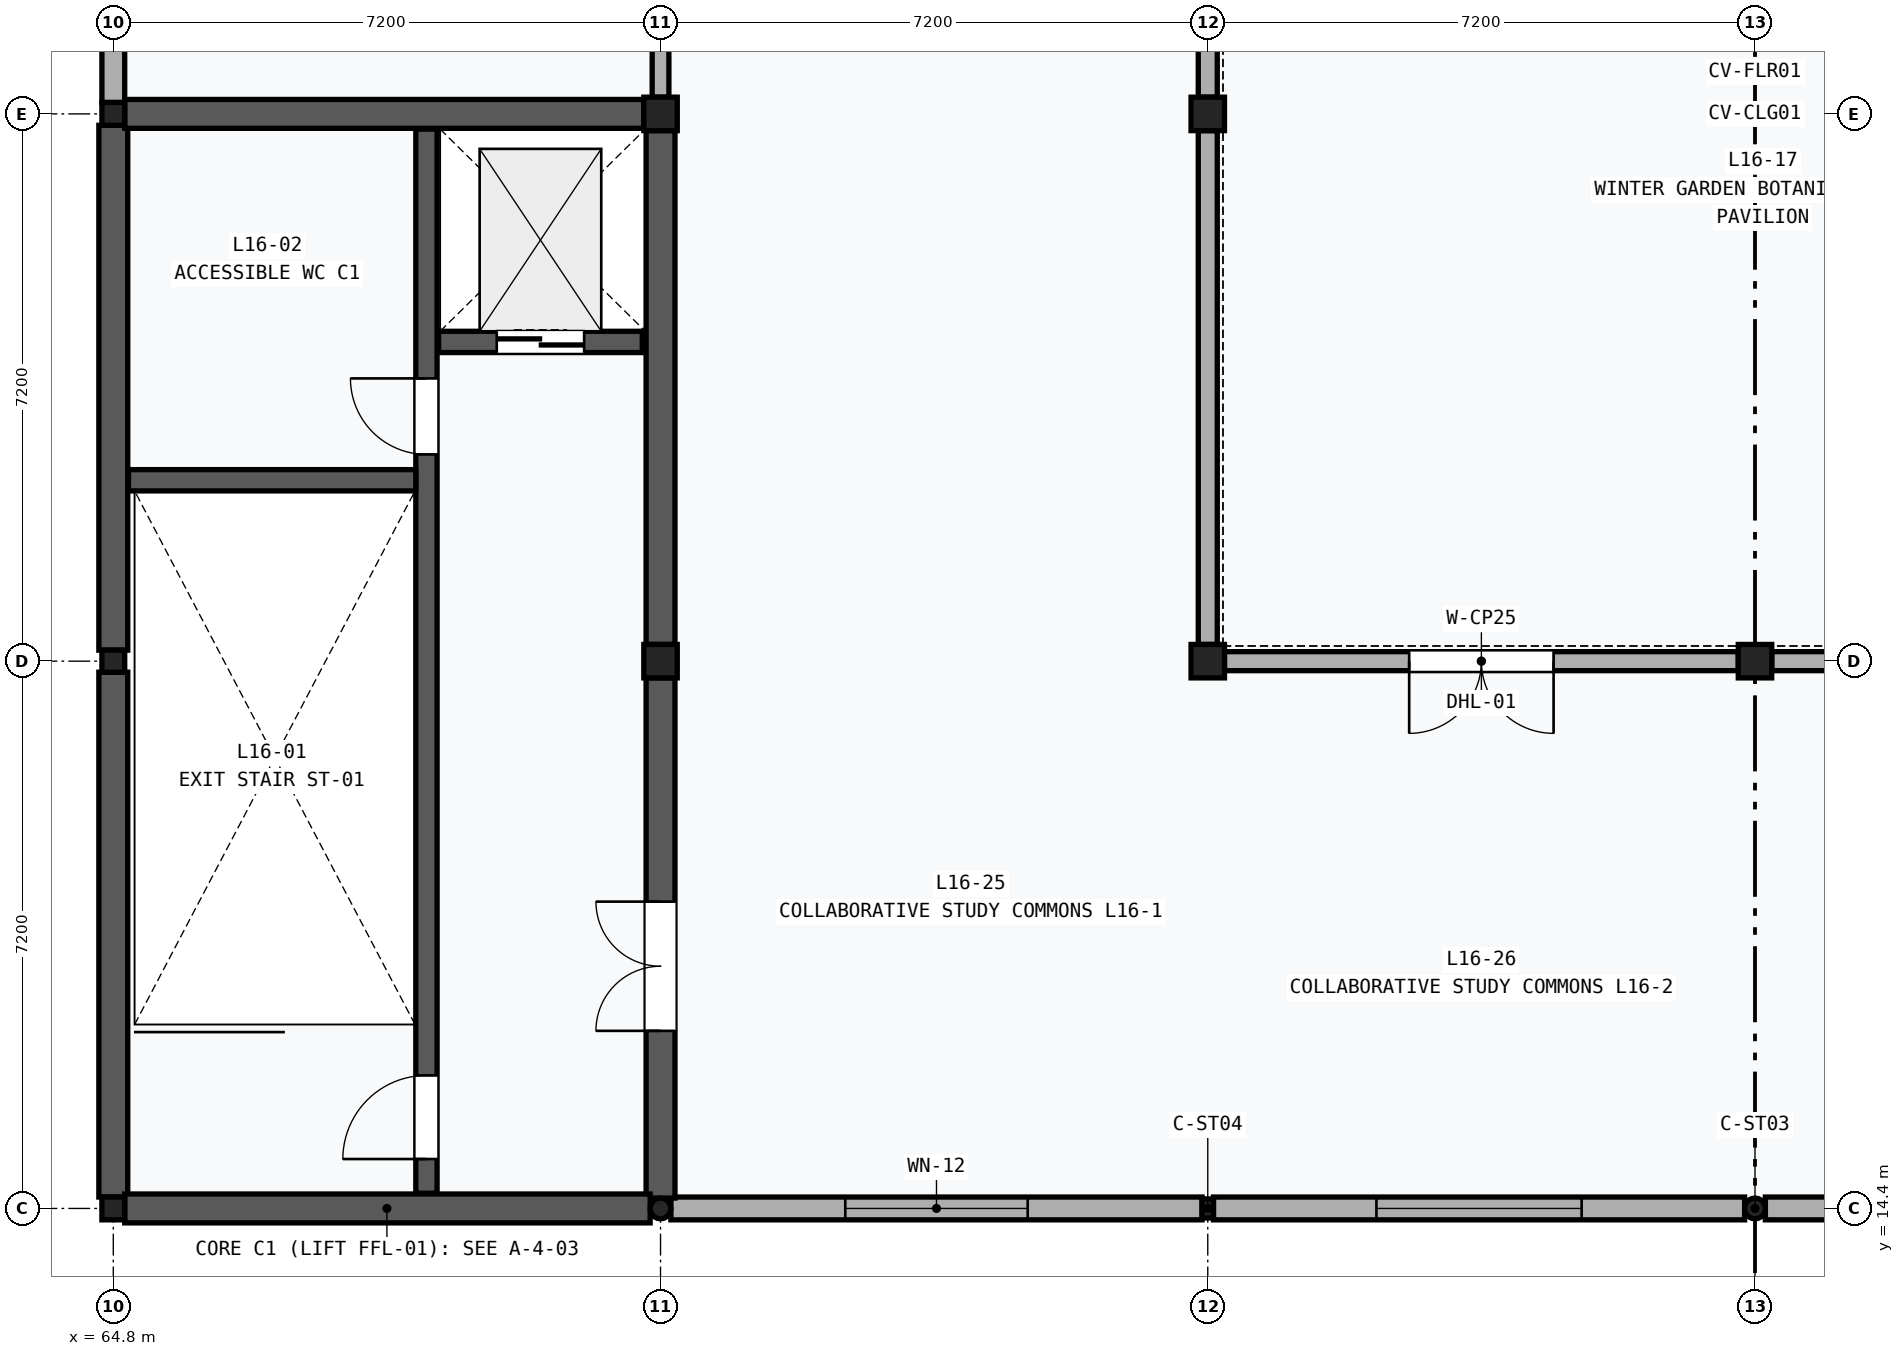
"""IFC4 building model, lengths in metres.
Left out: names, types, materials, properties, quantities, classifications, styles, units other than length and angle.
Written with IfcOpenShell. Run it as: python <this file> out.ifc"""

import sys

from ifc_helpers import new_model, si_unit, direction, frame, frame_2d, origin, origin_2d, place, context, subcontext, project, spatial, rectangle, hollow_rectangle, hollow_circle, i_section, extrude, element, fill, save


model = new_model("IFC4")
c1 = context("Model", 3, precision=1e-05, world=origin(), true_north=direction((0.0, 1.0)))
c2 = subcontext(c1, "Body", "Model", "MODEL_VIEW")
j1 = project(units=[si_unit("LENGTHUNIT", "METRE"), si_unit("PLANEANGLEUNIT", "RADIAN")], contexts=[c1])
p1 = place(None, origin())
s1 = spatial("IfcSite", under=j1, at=p1, CompositionType="ELEMENT")
p2 = place(p1, origin())
s2 = spatial("IfcBuilding", under=s1, at=p2, CompositionType="ELEMENT")
p3 = place(p2, frame((0.0, 0.0, 67.2)))
s3 = spatial("IfcBuildingStorey", under=s2, at=p3, CompositionType="ELEMENT", Elevation=67.2)
p4 = place(p3, frame((64.8, 14.4, 0.0), z_axis=(0.0, 0.0, 1.0), x_axis=(1.0, 0.0, 0.0)))
e1 = element("IfcColumn", 1, at=p4, inside=s3, PredefinedType="COLUMN", context=c2, shape_type="SweptSolid", body=[
    extrude(i_section(OverallWidth=0.3, OverallDepth=0.3, WebThickness=0.011, FlangeThickness=0.019, FilletRadius=0.027, at=origin_2d()), origin(), (0.0, 0.0, 1.0), 4.8),
])
p5 = place(p3, frame((64.8, 21.6, 0.0), z_axis=(0.0, 0.0, 1.0), x_axis=(1.0, 0.0, 0.0)))
e2 = element("IfcColumn", 2, at=p5, inside=s3, PredefinedType="COLUMN", context=c2, shape_type="SweptSolid", body=[
    extrude(i_section(OverallWidth=0.3, OverallDepth=0.29, WebThickness=0.009, FlangeThickness=0.014, FilletRadius=0.027, at=origin_2d()), origin(), (0.0, 0.0, 1.0), 4.8),
])
p6 = place(p3, frame((64.8, 28.8, 0.0), z_axis=(0.0, 0.0, 1.0), x_axis=(1.0, 0.0, 0.0)))
e3 = element("IfcColumn", 3, at=p6, inside=s3, PredefinedType="COLUMN", context=c2, shape_type="SweptSolid", body=[
    extrude(i_section(OverallWidth=0.3, OverallDepth=0.3, WebThickness=0.011, FlangeThickness=0.019, FilletRadius=0.027, at=origin_2d()), origin(), (0.0, 0.0, 1.0), 4.8),
])
p7 = place(p3, frame((72.0, 14.4, 0.0), z_axis=(0.0, 0.0, 1.0), x_axis=(1.0, 0.0, 0.0)))
e4 = element("IfcColumn", 4, at=p7, inside=s3, PredefinedType="COLUMN", context=c2, shape_type="SweptSolid", body=[
    extrude(hollow_circle(Radius=0.136, WallThickness=0.012, at=origin_2d()), origin(), (0.0, 0.0, 1.0), 4.8),
])
for number, where, z_axis, x_axis in (
    (5, (72.0, 21.6, 0.0), (0.0, 0.0, 1.0), (1.0, 0.0, 0.0)),
    (6, (72.0, 28.8, 0.0), (0.0, 0.0, 1.0), (1.0, 0.0, 0.0)),
):
    element("IfcColumn", number, at=place(p3, frame(where, z_axis=z_axis, x_axis=x_axis)), inside=s3, PredefinedType="COLUMN", context=c2, shape_type="SweptSolid", body=[
        extrude(rectangle(XDim=0.44, YDim=0.44, at=origin_2d()), origin(), (0.0, 0.0, 1.0), 4.8),
    ])
p8 = place(p3, frame((79.2, 14.4, 0.0), z_axis=(0.0, 0.0, 1.0), x_axis=(1.0, 0.0, 0.0)))
e7 = element("IfcColumn", 7, at=p8, inside=s3, PredefinedType="COLUMN", context=c2, shape_type="SweptSolid", body=[
    extrude(hollow_rectangle(XDim=0.15, YDim=0.25, WallThickness=0.01, at=origin_2d()), origin(), (0.0, 0.0, 1.0), 4.8),
])
for number, where, z_axis, x_axis in (
    (8, (79.2, 21.6, 0.0), (0.0, 0.0, 1.0), (1.0, 0.0, 0.0)),
    (9, (79.2, 28.8, 0.0), (0.0, 0.0, 1.0), (1.0, 0.0, 0.0)),
):
    element("IfcColumn", number, at=place(p3, frame(where, z_axis=z_axis, x_axis=x_axis)), inside=s3, PredefinedType="COLUMN", context=c2, shape_type="SweptSolid", body=[
        extrude(rectangle(XDim=0.44, YDim=0.44, at=origin_2d()), origin(), (0.0, 0.0, 1.0), 4.8),
    ])
p9 = place(p3, frame((86.4, 14.4, 0.0), z_axis=(0.0, 0.0, 1.0), x_axis=(1.0, 0.0, 0.0)))
e10 = element("IfcColumn", 10, at=p9, inside=s3, PredefinedType="COLUMN", context=c2, shape_type="SweptSolid", body=[
    extrude(hollow_circle(Radius=0.136, WallThickness=0.012, at=origin_2d()), origin(), (0.0, 0.0, 1.0), 4.8),
])
p10 = place(p3, frame((86.4, 21.6, 0.0), z_axis=(0.0, 0.0, 1.0), x_axis=(1.0, 0.0, 0.0)))
e11 = element("IfcColumn", 11, at=p10, inside=s3, PredefinedType="COLUMN", context=c2, shape_type="SweptSolid", body=[
    extrude(rectangle(XDim=0.44, YDim=0.44, at=origin_2d()), origin(), (0.0, 0.0, 1.0), 4.8),
])
p11 = place(p3, frame((64.8, 28.95, 0.0), z_axis=(0.0, 0.0, 1.0), x_axis=(0.0, 1.0, 0.0)))
e12 = element("IfcWall", 12, at=p11, inside=s3, PredefinedType="SOLIDWALL", context=c2, shape_type="SweptSolid", body=[
    extrude(rectangle(XDim=6.905, YDim=0.3, at=frame_2d((3.453, 0.0))), origin(), (0.0, 0.0, 1.0), 4.16),
])
p12 = place(p11, frame((2.103, 0.0, 0.85)))
e13 = element("IfcOpeningElement", 13, at=p12, cuts=e12, PredefinedType="OPENING", context=c2, shape_type="SweptSolid", body=[
    extrude(rectangle(XDim=2.7, YDim=2.0, at=frame_2d((1.35, 1.0))), frame((0.0, 0.162, 0.0), z_axis=(0.0, -1.0, 0.0), x_axis=(1.0, 0.0, 0.0)), (0.0, 0.0, 1.0), 0.324),
])
p13 = place(p3, frame((72.136, 14.4, 0.0), z_axis=(0.0, 0.0, 1.0), x_axis=(1.0, 0.0, 0.0)))
e14 = element("IfcWall", 14, at=p13, inside=s3, PredefinedType="SOLIDWALL", context=c2, shape_type="SweptSolid", body=[
    extrude(rectangle(XDim=6.989, YDim=0.3, at=frame_2d((3.494, 0.0))), origin(), (0.0, 0.0, 1.0), 4.16),
])
p14 = place(p13, frame((2.294, 0.0, 0.85)))
e15 = element("IfcOpeningElement", 15, at=p14, cuts=e14, PredefinedType="OPENING", context=c2, shape_type="SweptSolid", body=[
    extrude(rectangle(XDim=2.4, YDim=2.0, at=frame_2d((1.2, 1.0))), frame((0.0, 0.162, 0.0), z_axis=(0.0, -1.0, 0.0), x_axis=(1.0, 0.0, 0.0)), (0.0, 0.0, 1.0), 0.324),
])
p15 = place(p3, frame((79.275, 14.4, 0.0), z_axis=(0.0, 0.0, 1.0), x_axis=(1.0, 0.0, 0.0)))
e16 = element("IfcWall", 16, at=p15, inside=s3, PredefinedType="SOLIDWALL", context=c2, shape_type="SweptSolid", body=[
    extrude(rectangle(XDim=6.989, YDim=0.3, at=frame_2d((3.494, 0.0))), origin(), (0.0, 0.0, 1.0), 4.16),
])
p16 = place(p15, frame((2.144, 0.0, 0.85)))
e17 = element("IfcOpeningElement", 17, at=p16, cuts=e16, PredefinedType="OPENING", context=c2, shape_type="SweptSolid", body=[
    extrude(rectangle(XDim=2.7, YDim=2.0, at=frame_2d((1.35, 1.0))), frame((0.0, 0.162, 0.0), z_axis=(0.0, -1.0, 0.0), x_axis=(1.0, 0.0, 0.0)), (0.0, 0.0, 1.0), 0.324),
])
p17 = place(p3, frame((86.537, 14.4, 0.0), z_axis=(0.0, 0.0, 1.0), x_axis=(1.0, 0.0, 0.0)))
e18 = element("IfcWall", 18, at=p17, inside=s3, PredefinedType="SOLIDWALL", context=c2, shape_type="SweptSolid", body=[
    extrude(rectangle(XDim=6.988, YDim=0.3, at=frame_2d((3.494, 0.0))), origin(), (0.0, 0.0, 1.0), 4.16),
])
p18 = place(p17, frame((1.994, 0.0, 0.85)))
e19 = element("IfcOpeningElement", 19, at=p18, cuts=e18, PredefinedType="OPENING", context=c2, shape_type="SweptSolid", body=[
    extrude(rectangle(XDim=3.0, YDim=2.0, at=frame_2d((1.5, 1.0))), frame((0.0, 0.162, 0.0), z_axis=(0.0, -1.0, 0.0), x_axis=(1.0, 0.0, 0.0)), (0.0, 0.0, 1.0), 0.324),
])
p19 = place(p3, frame((64.8, 14.55, 0.0), z_axis=(0.0, 0.0, 1.0), x_axis=(0.0, 1.0, 0.0)))
e20 = element("IfcWall", 20, at=p19, inside=s3, PredefinedType="SHEAR", context=c2, shape_type="SweptSolid", body=[
    extrude(rectangle(XDim=6.905, YDim=0.38, at=frame_2d((3.453, 0.0))), origin(), (0.0, 0.0, 1.0), 4.16),
])
p20 = place(p3, frame((64.8, 21.745, 0.0), z_axis=(0.0, 0.0, 1.0), x_axis=(0.0, 1.0, 0.0)))
e21 = element("IfcWall", 21, at=p20, inside=s3, PredefinedType="SHEAR", context=c2, shape_type="SweptSolid", body=[
    extrude(rectangle(XDim=6.905, YDim=0.38, at=frame_2d((3.452, 0.0))), origin(), (0.0, 0.0, 1.0), 4.16),
])
p21 = place(p3, frame((72.0, 14.537, 0.0), z_axis=(0.0, 0.0, 1.0), x_axis=(0.0, 1.0, 0.0)))
e22 = element("IfcWall", 22, at=p21, inside=s3, PredefinedType="SHEAR", context=c2, shape_type="SweptSolid", body=[
    extrude(rectangle(XDim=6.843, YDim=0.38, at=frame_2d((3.422, 0.0))), origin(), (0.0, 0.0, 1.0), 4.26),
])
p22 = place(p21, frame((2.2, 0.0, 0.0)))
e23 = element("IfcOpeningElement", 23, at=p22, cuts=e22, PredefinedType="OPENING", context=c2, shape_type="SweptSolid", body=[
    extrude(rectangle(XDim=1.7, YDim=2.25, at=frame_2d((0.85, 1.125))), frame((0.0, 0.202, 0.0), z_axis=(0.0, -1.0, 0.0), x_axis=(1.0, 0.0, 0.0)), (0.0, 0.0, 1.0), 0.404),
])
p23 = place(p3, frame((72.0, 21.82, 0.0), z_axis=(0.0, 0.0, 1.0), x_axis=(0.0, 1.0, 0.0)))
e24 = element("IfcWall", 24, at=p23, inside=s3, PredefinedType="SHEAR", context=c2, shape_type="SweptSolid", body=[
    extrude(rectangle(XDim=6.76, YDim=0.38, at=frame_2d((3.38, 0.0))), origin(), (0.0, 0.0, 1.0), 4.26),
])
p24 = place(p3, frame((64.95, 14.4, 0.0), z_axis=(0.0, 0.0, 1.0), x_axis=(1.0, 0.0, 0.0)))
e25 = element("IfcWall", 25, at=p24, inside=s3, PredefinedType="SHEAR", context=c2, shape_type="SweptSolid", body=[
    extrude(rectangle(XDim=6.914, YDim=0.38, at=frame_2d((3.457, 0.0))), origin(), (0.0, 0.0, 1.0), 4.16),
])
p25 = place(p3, frame((64.95, 28.8, 0.0), z_axis=(0.0, 0.0, 1.0), x_axis=(1.0, 0.0, 0.0)))
e26 = element("IfcWall", 26, at=p25, inside=s3, PredefinedType="SHEAR", context=c2, shape_type="SweptSolid", body=[
    extrude(rectangle(XDim=6.83, YDim=0.38, at=frame_2d((3.415, 0.0))), origin(), (0.0, 0.0, 1.0), 4.2),
])
p26 = place(p3, frame((68.92, 14.6, 0.0), z_axis=(0.0, 0.0, 1.0), x_axis=(0.0, 1.0, 0.0)))
e27 = element("IfcWall", 27, at=p26, inside=s3, PredefinedType="SHEAR", context=c2, shape_type="SweptSolid", body=[
    extrude(rectangle(XDim=14.0, YDim=0.28, at=frame_2d((7.0, 0.0))), origin(), (0.0, 0.0, 1.0), 4.54),
])
p27 = place(p26, frame((0.45, 0.0, 0.0)))
e28 = element("IfcOpeningElement", 28, at=p27, cuts=e27, PredefinedType="OPENING", context=c2, shape_type="SweptSolid", body=[
    extrude(rectangle(XDim=1.1, YDim=2.15, at=frame_2d((0.55, 1.075))), frame((0.0, 0.152, 0.0), z_axis=(0.0, -1.0, 0.0), x_axis=(1.0, 0.0, 0.0)), (0.0, 0.0, 1.0), 0.304),
])
p28 = place(p26, frame((9.72, 0.0, 0.0)))
e29 = element("IfcOpeningElement", 29, at=p28, cuts=e27, PredefinedType="OPENING", context=c2, shape_type="SweptSolid", body=[
    extrude(rectangle(XDim=1.0, YDim=2.15, at=frame_2d((0.5, 1.075))), frame((0.0, 0.152, 0.0), z_axis=(0.0, -1.0, 0.0), x_axis=(1.0, 0.0, 0.0)), (0.0, 0.0, 1.0), 0.304),
])
p29 = place(p3, frame((65.0, 23.98, 0.0), z_axis=(0.0, 0.0, 1.0), x_axis=(1.0, 0.0, 0.0)))
e30 = element("IfcWall", 30, at=p29, inside=s3, PredefinedType="SHEAR", context=c2, shape_type="SweptSolid", body=[
    extrude(rectangle(XDim=3.78, YDim=0.28, at=frame_2d((1.89, 0.0))), origin(), (0.0, 0.0, 1.0), 4.54),
])
p30 = place(p3, frame((69.08, 25.8, 0.0), z_axis=(0.0, 0.0, 1.0), x_axis=(1.0, 0.0, 0.0)))
e31 = element("IfcWall", 31, at=p30, inside=s3, PredefinedType="SHEAR", context=c2, shape_type="SweptSolid", body=[
    extrude(rectangle(XDim=2.68, YDim=0.28, at=frame_2d((1.34, 0.0))), origin(), (0.0, 0.0, 1.0), 4.54),
])
p31 = place(p30, frame((0.765, 0.0, 0.0)))
e32 = element("IfcOpeningElement", 32, at=p31, cuts=e31, PredefinedType="OPENING", context=c2, shape_type="SweptSolid", body=[
    extrude(rectangle(XDim=1.15, YDim=2.2, at=frame_2d((0.575, 1.1))), frame((0.0, 0.152, 0.0), z_axis=(0.0, -1.0, 0.0), x_axis=(1.0, 0.0, 0.0)), (0.0, 0.0, 1.0), 0.304),
])
p32 = place(p3, frame((79.42, 21.6, 0.0), z_axis=(0.0, 0.0, 1.0), x_axis=(1.0, 0.0, 0.0)))
e33 = element("IfcWall", 33, at=p32, inside=s3, PredefinedType="PARTITIONING", context=c2, shape_type="SweptSolid", body=[
    extrude(rectangle(XDim=6.76, YDim=0.25, at=frame_2d((3.38, 0.0))), origin(), (0.0, 0.0, 1.0), 4.2),
])
p33 = place(p32, frame((2.43, 0.0, 0.0)))
e34 = element("IfcOpeningElement", 34, at=p33, cuts=e33, PredefinedType="OPENING", context=c2, shape_type="SweptSolid", body=[
    extrude(rectangle(XDim=1.9, YDim=2.35, at=frame_2d((0.95, 1.175))), frame((0.0, 0.137, 0.0), z_axis=(0.0, -1.0, 0.0), x_axis=(1.0, 0.0, 0.0)), (0.0, 0.0, 1.0), 0.274),
])
for number, where, z_axis, x_axis in (
    (35, (79.2, 21.82, 0.0), (0.0, 0.0, 1.0), (0.0, 1.0, 0.0)),
    (36, (79.2, 29.02, 0.0), (0.0, 0.0, 1.0), (0.0, 1.0, 0.0)),
):
    element("IfcWall", number, at=place(p3, frame(where, z_axis=z_axis, x_axis=x_axis)), inside=s3, PredefinedType="PARTITIONING", context=c2, shape_type="SweptSolid", body=[
        extrude(rectangle(XDim=6.76, YDim=0.25, at=frame_2d((3.38, 0.0))), origin(), (0.0, 0.0, 1.0), 4.26),
    ])
p34 = place(p3, frame((86.62, 21.6, 0.0), z_axis=(0.0, 0.0, 1.0), x_axis=(1.0, 0.0, 0.0)))
e37 = element("IfcWall", 37, at=p34, inside=s3, PredefinedType="PARTITIONING", context=c2, shape_type="SweptSolid", body=[
    extrude(rectangle(XDim=6.76, YDim=0.25, at=frame_2d((3.38, 0.0))), origin(), (0.0, 0.0, 1.0), 4.2),
])
p35 = place(p3, frame((72.0, 29.02, 0.0), z_axis=(0.0, 0.0, 1.0), x_axis=(0.0, 1.0, 0.0)))
e38 = element("IfcWall", 38, at=p35, inside=s3, PredefinedType="PARTITIONING", context=c2, shape_type="SweptSolid", body=[
    extrude(rectangle(XDim=6.76, YDim=0.22, at=frame_2d((3.38, 0.0))), origin(), (0.0, 0.0, 1.0), 4.26),
])
p36 = place(p35, frame((2.86, 0.0, 0.0)))
e39 = element("IfcOpeningElement", 39, at=p36, cuts=e38, PredefinedType="OPENING", context=c2, shape_type="SweptSolid", body=[
    extrude(rectangle(XDim=1.04, YDim=2.14, at=frame_2d((0.52, 1.07))), frame((0.0, 0.122, 0.0), z_axis=(0.0, -1.0, 0.0), x_axis=(1.0, 0.0, 0.0)), (0.0, 0.0, 1.0), 0.244),
])
p37 = place(p14, origin())
e40 = element("IfcWindow", 40, at=p37, inside=s3, PartitioningType="SINGLE_PANEL", PredefinedType="WINDOW", context=c2, shape_type="SweptSolid", body=[
    extrude(rectangle(XDim=2.4, YDim=2.0, at=frame_2d((1.2, 1.0))), frame((0.0, 0.03, 0.0), z_axis=(0.0, -1.0, 0.0), x_axis=(1.0, 0.0, 0.0)), (0.0, 0.0, 1.0), 0.06),
])
fill(e15, e40)
p38 = place(p16, origin())
e41 = element("IfcWindow", 41, at=p38, inside=s3, PartitioningType="SINGLE_PANEL", PredefinedType="WINDOW", context=c2, shape_type="SweptSolid", body=[
    extrude(rectangle(XDim=2.7, YDim=2.0, at=frame_2d((1.35, 1.0))), frame((0.0, 0.03, 0.0), z_axis=(0.0, -1.0, 0.0), x_axis=(1.0, 0.0, 0.0)), (0.0, 0.0, 1.0), 0.06),
])
fill(e17, e41)
p39 = place(p22, origin())
e42 = element("IfcDoor", 42, at=p39, inside=s3, OperationType="DOUBLE_DOOR_SINGLE_SWING", PredefinedType="DOOR", context=c2, shape_type="SweptSolid", body=[
    extrude(rectangle(XDim=1.7, YDim=2.25, at=frame_2d((0.85, 1.125))), frame((0.0, 0.025, 0.0), z_axis=(0.0, -1.0, 0.0), x_axis=(1.0, 0.0, 0.0)), (0.0, 0.0, 1.0), 0.05),
])
fill(e23, e42)
p40 = place(p27, origin())
e43 = element("IfcDoor", 43, at=p40, inside=s3, OperationType="SINGLE_SWING_LEFT", PredefinedType="DOOR", context=c2, shape_type="SweptSolid", body=[
    extrude(rectangle(XDim=1.1, YDim=2.15, at=frame_2d((0.55, 1.075))), frame((0.0, 0.025, 0.0), z_axis=(0.0, -1.0, 0.0), x_axis=(1.0, 0.0, 0.0)), (0.0, 0.0, 1.0), 0.05),
])
fill(e28, e43)
p41 = place(p28, origin())
e44 = element("IfcDoor", 44, at=p41, inside=s3, OperationType="SINGLE_SWING_RIGHT", PredefinedType="DOOR", context=c2, shape_type="SweptSolid", body=[
    extrude(rectangle(XDim=1.0, YDim=2.15, at=frame_2d((0.5, 1.075))), frame((0.0, 0.025, 0.0), z_axis=(0.0, -1.0, 0.0), x_axis=(1.0, 0.0, 0.0)), (0.0, 0.0, 1.0), 0.05),
])
fill(e29, e44)
p42 = place(p31, frame((1.15, 0.0, 0.0), z_axis=(0.0, 0.0, 1.0), x_axis=(-1.0, 0.0, 0.0)))
e45 = element("IfcDoor", 45, at=p42, inside=s3, OperationType="DOUBLE_DOOR_SLIDING", PredefinedType="DOOR", context=c2, shape_type="SweptSolid", body=[
    extrude(rectangle(XDim=1.15, YDim=2.2, at=frame_2d((0.575, 1.1))), frame((0.0, 0.025, 0.0), z_axis=(0.0, -1.0, 0.0), x_axis=(1.0, 0.0, 0.0)), (0.0, 0.0, 1.0), 0.05),
])
fill(e32, e45)
p43 = place(p33, frame((1.9, 0.0, 0.0), z_axis=(0.0, 0.0, 1.0), x_axis=(-1.0, 0.0, 0.0)))
e46 = element("IfcDoor", 46, at=p43, inside=s3, OperationType="DOUBLE_DOOR_SINGLE_SWING", PredefinedType="DOOR", context=c2, shape_type="SweptSolid", body=[
    extrude(rectangle(XDim=1.9, YDim=2.35, at=frame_2d((0.95, 1.175))), frame((0.0, 0.025, 0.0), z_axis=(0.0, -1.0, 0.0), x_axis=(1.0, 0.0, 0.0)), (0.0, 0.0, 1.0), 0.05),
])
fill(e34, e46)
save(model, sys.argv[1])
